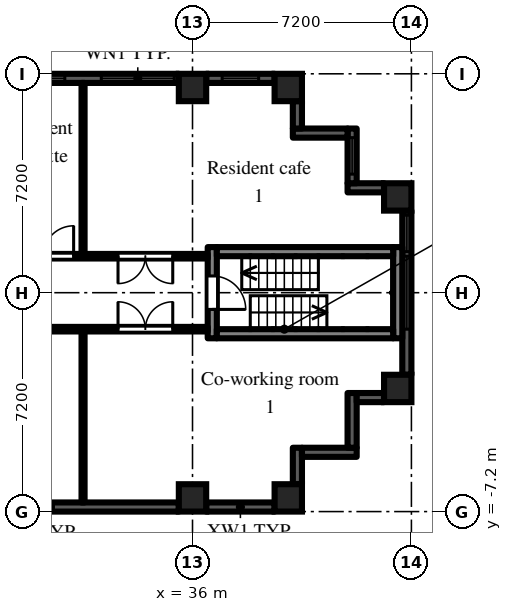
"""IFC4 building model, lengths in metres.
Left out: names, types, materials, properties, quantities, classifications, styles, units other than length and angle.
Written with IfcOpenShell. Run it as: python <this file> out.ifc"""

import sys

from ifc_helpers import new_model, si_unit, direction, frame, frame_2d, origin, origin_2d, place, context, subcontext, project, spatial, rectangle, extrude, element, fill, save


model = new_model("IFC4")
c1 = context("Model", 3, precision=1e-05, world=origin(), true_north=direction((0.0, 1.0)))
c2 = subcontext(c1, "Body", "Model", "MODEL_VIEW")
j1 = project(units=[si_unit("LENGTHUNIT", "METRE"), si_unit("PLANEANGLEUNIT", "RADIAN")], contexts=[c1])
p1 = place(None, origin())
s1 = spatial("IfcSite", under=j1, at=p1, CompositionType="ELEMENT")
p2 = place(p1, origin())
s2 = spatial("IfcBuilding", under=s1, at=p2, CompositionType="ELEMENT")
p3 = place(p2, frame((0.0, 0.0, 44.7)))
s3 = spatial("IfcBuildingStorey", under=s2, at=p3, CompositionType="ELEMENT", Elevation=44.7)
for number, where, z_axis, x_axis in (
    (1, (36.0, -6.75, 0.0), (0.0, 0.0, 1.0), (1.0, 0.0, 0.0)),
    (2, (36.0, 6.75, 0.0), (0.0, 0.0, 1.0), (1.0, 0.0, 0.0)),
    (3, (39.15, -6.75, 0.0), (0.0, 0.0, 1.0), (1.0, 0.0, 0.0)),
    (4, (39.15, 6.75, 0.0), (0.0, 0.0, 1.0), (1.0, 0.0, 0.0)),
    (5, (42.75, -3.15, 0.0), (0.0, 0.0, 1.0), (1.0, 0.0, 0.0)),
    (6, (42.75, 3.15, 0.0), (0.0, 0.0, 1.0), (1.0, 0.0, 0.0)),
):
    element("IfcColumn", number, at=place(p3, frame(where, z_axis=z_axis, x_axis=x_axis)), inside=s3, PredefinedType="COLUMN", context=c2, shape_type="SweptSolid", body=[
        extrude(rectangle(XDim=0.9, YDim=0.9, at=origin_2d()), origin(), (0.0, 0.0, 1.0), 3.0),
    ])
p4 = place(p3, frame((29.25, -7.05, 0.0), z_axis=(0.0, 0.0, 1.0), x_axis=(1.0, 0.0, 0.0)))
e7 = element("IfcWall", 7, at=p4, inside=s3, PredefinedType="SOLIDWALL", context=c2, shape_type="SweptSolid", body=[
    extrude(rectangle(XDim=6.3, YDim=0.3, at=frame_2d((3.15, 0.0))), origin(), (0.0, 0.0, 1.0), 2.1),
])
p5 = place(p4, frame((0.975, 0.0, 0.2)))
e8 = element("IfcOpeningElement", 8, at=p5, cuts=e7, PredefinedType="OPENING", context=c2, shape_type="SweptSolid", body=[
    extrude(rectangle(XDim=1.2, YDim=1.85, at=frame_2d((0.6, 0.925))), frame((0.0, 0.16, 0.0), z_axis=(0.0, -1.0, 0.0), x_axis=(1.0, 0.0, 0.0)), (0.0, 0.0, 1.0), 0.32),
])
p6 = place(p3, frame((36.45, -7.05, 0.0), z_axis=(0.0, 0.0, 1.0), x_axis=(1.0, 0.0, 0.0)))
e9 = element("IfcWall", 9, at=p6, inside=s3, PredefinedType="SOLIDWALL", context=c2, shape_type="SweptSolid", body=[
    extrude(rectangle(XDim=2.25, YDim=0.3, at=frame_2d((1.125, 0.0))), origin(), (0.0, 0.0, 1.0), 2.1),
])
p7 = place(p3, frame((39.45, -6.3, 0.0), z_axis=(0.0, 0.0, 1.0), x_axis=(0.0, 1.0, 0.0)))
e10 = element("IfcWall", 10, at=p7, inside=s3, PredefinedType="SOLIDWALL", context=c2, shape_type="SweptSolid", body=[
    extrude(rectangle(XDim=1.2, YDim=0.3, at=frame_2d((0.6, 0.0))), origin(), (0.0, 0.0, 1.0), 2.575),
])
p8 = place(p3, frame((39.6, -5.25, 0.0), z_axis=(0.0, 0.0, 1.0), x_axis=(1.0, 0.0, 0.0)))
e11 = element("IfcWall", 11, at=p8, inside=s3, PredefinedType="SOLIDWALL", context=c2, shape_type="SweptSolid", body=[
    extrude(rectangle(XDim=1.8, YDim=0.3, at=frame_2d((0.9, 0.0))), origin(), (0.0, 0.0, 1.0), 2.575),
])
p9 = place(p3, frame((41.25, -5.1, 0.0), z_axis=(0.0, 0.0, 1.0), x_axis=(0.0, 1.0, 0.0)))
e12 = element("IfcWall", 12, at=p9, inside=s3, PredefinedType="SOLIDWALL", context=c2, shape_type="SweptSolid", body=[
    extrude(rectangle(XDim=1.8, YDim=0.3, at=frame_2d((0.9, 0.0))), origin(), (0.0, 0.0, 1.0), 2.575),
])
p10 = place(p3, frame((41.4, -3.45, 0.0), z_axis=(0.0, 0.0, 1.0), x_axis=(1.0, 0.0, 0.0)))
e13 = element("IfcWall", 13, at=p10, inside=s3, PredefinedType="SOLIDWALL", context=c2, shape_type="SweptSolid", body=[
    extrude(rectangle(XDim=0.9, YDim=0.3, at=frame_2d((0.45, 0.0))), origin(), (0.0, 0.0, 1.0), 2.575),
])
p11 = place(p3, frame((43.05, -2.7, 0.0), z_axis=(0.0, 0.0, 1.0), x_axis=(0.0, 1.0, 0.0)))
e14 = element("IfcWall", 14, at=p11, inside=s3, PredefinedType="SOLIDWALL", context=c2, shape_type="SweptSolid", body=[
    extrude(rectangle(XDim=5.4, YDim=0.3, at=frame_2d((2.7, 0.0))), origin(), (0.0, 0.0, 1.0), 2.1),
])
p12 = place(p11, frame((1.5, 0.0, 0.2)))
e15 = element("IfcOpeningElement", 15, at=p12, cuts=e14, PredefinedType="OPENING", context=c2, shape_type="SweptSolid", body=[
    extrude(rectangle(XDim=2.4, YDim=1.85, at=frame_2d((1.2, 0.925))), frame((0.0, 0.16, 0.0), z_axis=(0.0, -1.0, 0.0), x_axis=(1.0, 0.0, 0.0)), (0.0, 0.0, 1.0), 0.32),
])
p13 = place(p11, frame((4.05, 0.0, 0.2)))
e16 = element("IfcOpeningElement", 16, at=p13, cuts=e14, PredefinedType="OPENING", context=c2, shape_type="SweptSolid", body=[
    extrude(rectangle(XDim=1.2, YDim=1.85, at=frame_2d((0.6, 0.925))), frame((0.0, 0.16, 0.0), z_axis=(0.0, -1.0, 0.0), x_axis=(1.0, 0.0, 0.0)), (0.0, 0.0, 1.0), 0.32),
])
p14 = place(p3, frame((42.3, 3.45, 0.0), z_axis=(0.0, 0.0, 1.0), x_axis=(-1.0, 0.0, 0.0)))
e17 = element("IfcWall", 17, at=p14, inside=s3, PredefinedType="SOLIDWALL", context=c2, shape_type="SweptSolid", body=[
    extrude(rectangle(XDim=1.2, YDim=0.3, at=frame_2d((0.6, 0.0))), origin(), (0.0, 0.0, 1.0), 2.575),
])
p15 = place(p3, frame((41.25, 3.6, 0.0), z_axis=(0.0, 0.0, 1.0), x_axis=(0.0, 1.0, 0.0)))
e18 = element("IfcWall", 18, at=p15, inside=s3, PredefinedType="SOLIDWALL", context=c2, shape_type="SweptSolid", body=[
    extrude(rectangle(XDim=1.8, YDim=0.3, at=frame_2d((0.9, 0.0))), origin(), (0.0, 0.0, 1.0), 2.575),
])
p16 = place(p15, frame((0.3, 0.0, 0.2)))
e19 = element("IfcOpeningElement", 19, at=p16, cuts=e18, PredefinedType="OPENING", context=c2, shape_type="SweptSolid", body=[
    extrude(rectangle(XDim=1.2, YDim=1.85, at=frame_2d((0.6, 0.925))), frame((0.0, 0.16, 0.0), z_axis=(0.0, -1.0, 0.0), x_axis=(1.0, 0.0, 0.0)), (0.0, 0.0, 1.0), 0.32),
])
p17 = place(p3, frame((41.1, 5.25, 0.0), z_axis=(0.0, 0.0, 1.0), x_axis=(-1.0, 0.0, 0.0)))
e20 = element("IfcWall", 20, at=p17, inside=s3, PredefinedType="SOLIDWALL", context=c2, shape_type="SweptSolid", body=[
    extrude(rectangle(XDim=1.8, YDim=0.3, at=frame_2d((0.9, 0.0))), origin(), (0.0, 0.0, 1.0), 2.575),
])
p18 = place(p3, frame((39.45, 5.4, 0.0), z_axis=(0.0, 0.0, 1.0), x_axis=(0.0, 1.0, 0.0)))
e21 = element("IfcWall", 21, at=p18, inside=s3, PredefinedType="SOLIDWALL", context=c2, shape_type="SweptSolid", body=[
    extrude(rectangle(XDim=0.9, YDim=0.3, at=frame_2d((0.45, 0.0))), origin(), (0.0, 0.0, 1.0), 2.575),
])
p19 = place(p3, frame((38.7, 7.05, 0.0), z_axis=(0.0, 0.0, 1.0), x_axis=(-1.0, 0.0, 0.0)))
e22 = element("IfcWall", 22, at=p19, inside=s3, PredefinedType="SOLIDWALL", context=c2, shape_type="SweptSolid", body=[
    extrude(rectangle(XDim=2.25, YDim=0.3, at=frame_2d((1.125, 0.0))), origin(), (0.0, 0.0, 1.0), 2.1),
])
p20 = place(p19, frame((0.525, 0.0, 0.2)))
e23 = element("IfcOpeningElement", 23, at=p20, cuts=e22, PredefinedType="OPENING", context=c2, shape_type="SweptSolid", body=[
    extrude(rectangle(XDim=1.2, YDim=1.85, at=frame_2d((0.6, 0.925))), frame((0.0, 0.16, 0.0), z_axis=(0.0, -1.0, 0.0), x_axis=(1.0, 0.0, 0.0)), (0.0, 0.0, 1.0), 0.32),
])
p21 = place(p3, frame((35.55, 7.05, 0.0), z_axis=(0.0, 0.0, 1.0), x_axis=(-1.0, 0.0, 0.0)))
e24 = element("IfcWall", 24, at=p21, inside=s3, PredefinedType="SOLIDWALL", context=c2, shape_type="SweptSolid", body=[
    extrude(rectangle(XDim=6.3, YDim=0.3, at=frame_2d((3.15, 0.0))), origin(), (0.0, 0.0, 1.0), 2.1),
])
p22 = place(p21, frame((0.15, 0.0, 0.2)))
e25 = element("IfcOpeningElement", 25, at=p22, cuts=e24, PredefinedType="OPENING", context=c2, shape_type="SweptSolid", body=[
    extrude(rectangle(XDim=2.4, YDim=1.85, at=frame_2d((1.2, 0.925))), frame((0.0, 0.16, 0.0), z_axis=(0.0, -1.0, 0.0), x_axis=(1.0, 0.0, 0.0)), (0.0, 0.0, 1.0), 0.32),
])
p23 = place(p21, frame((3.75, 0.0, 0.2)))
e26 = element("IfcOpeningElement", 26, at=p23, cuts=e24, PredefinedType="OPENING", context=c2, shape_type="SweptSolid", body=[
    extrude(rectangle(XDim=2.4, YDim=1.85, at=frame_2d((1.2, 0.925))), frame((0.0, 0.16, 0.0), z_axis=(0.0, -1.0, 0.0), x_axis=(1.0, 0.0, 0.0)), (0.0, 0.0, 1.0), 0.32),
])
p24 = place(p3, frame((36.65, -1.5, 0.0), z_axis=(0.0, 0.0, 1.0), x_axis=(0.0, 1.0, 0.0)))
e27 = element("IfcWall", 27, at=p24, inside=s3, PredefinedType="SHEAR", context=c2, shape_type="SweptSolid", body=[
    extrude(rectangle(XDim=3.0, YDim=0.3, at=frame_2d((1.5, 0.0))), origin(), (0.0, 0.0, 1.0), 2.575),
])
p25 = place(p24, frame((0.95, 0.0, 0.0)))
e28 = element("IfcOpeningElement", 28, at=p25, cuts=e27, PredefinedType="OPENING", context=c2, shape_type="SweptSolid", body=[
    extrude(rectangle(XDim=1.1, YDim=2.1, at=frame_2d((0.55, 1.05))), frame((0.0, 0.16, 0.0), z_axis=(0.0, -1.0, 0.0), x_axis=(1.0, 0.0, 0.0)), (0.0, 0.0, 1.0), 0.32),
])
p26 = place(p3, frame((42.75, -1.5, 0.0), z_axis=(0.0, 0.0, 1.0), x_axis=(0.0, 1.0, 0.0)))
e29 = element("IfcWall", 29, at=p26, inside=s3, PredefinedType="SHEAR", context=c2, shape_type="SweptSolid", body=[
    extrude(rectangle(XDim=3.0, YDim=0.3, at=frame_2d((1.5, 0.0))), origin(), (0.0, 0.0, 1.0), 2.575),
])
for number, where, z_axis, x_axis in (
    (30, (36.8, -1.35, 0.0), (0.0, 0.0, 1.0), (1.0, 0.0, 0.0)),
    (31, (36.8, 1.35, 0.0), (0.0, 0.0, 1.0), (1.0, 0.0, 0.0)),
):
    element("IfcWall", number, at=place(p3, frame(where, z_axis=z_axis, x_axis=x_axis)), inside=s3, PredefinedType="SHEAR", context=c2, shape_type="SweptSolid", body=[
        extrude(rectangle(XDim=5.8, YDim=0.3, at=frame_2d((2.9, 0.0))), origin(), (0.0, 0.0, 1.0), 2.575),
    ])
p27 = place(p3, frame((21.6, -1.2, 0.0), z_axis=(0.0, 0.0, 1.0), x_axis=(1.0, 0.0, 0.0)))
e32 = element("IfcWall", 32, at=p27, inside=s3, PredefinedType="PARTITIONING", context=c2, shape_type="SweptSolid", body=[
    extrude(rectangle(XDim=14.9, YDim=0.15, at=frame_2d((7.45, 0.0))), origin(), (0.0, 0.0, 1.0), 2.575),
])
p28 = place(p27, frame((0.45, 0.0, 0.0)))
e33 = element("IfcOpeningElement", 33, at=p28, cuts=e32, PredefinedType="OPENING", context=c2, shape_type="SweptSolid", body=[
    extrude(rectangle(XDim=0.9, YDim=2.1, at=frame_2d((0.45, 1.05))), frame((0.0, 0.085, 0.0), z_axis=(0.0, -1.0, 0.0), x_axis=(1.0, 0.0, 0.0)), (0.0, 0.0, 1.0), 0.17),
])
p29 = place(p27, frame((2.25, 0.0, 0.0)))
e34 = element("IfcOpeningElement", 34, at=p29, cuts=e32, PredefinedType="OPENING", context=c2, shape_type="SweptSolid", body=[
    extrude(rectangle(XDim=0.9, YDim=2.1, at=frame_2d((0.45, 1.05))), frame((0.0, 0.085, 0.0), z_axis=(0.0, -1.0, 0.0), x_axis=(1.0, 0.0, 0.0)), (0.0, 0.0, 1.0), 0.17),
])
p30 = place(p27, frame((4.05, 0.0, 0.0)))
e35 = element("IfcOpeningElement", 35, at=p30, cuts=e32, PredefinedType="OPENING", context=c2, shape_type="SweptSolid", body=[
    extrude(rectangle(XDim=0.9, YDim=2.1, at=frame_2d((0.45, 1.05))), frame((0.0, 0.085, 0.0), z_axis=(0.0, -1.0, 0.0), x_axis=(1.0, 0.0, 0.0)), (0.0, 0.0, 1.0), 0.17),
])
p31 = place(p27, frame((5.85, 0.0, 0.0)))
e36 = element("IfcOpeningElement", 36, at=p31, cuts=e32, PredefinedType="OPENING", context=c2, shape_type="SweptSolid", body=[
    extrude(rectangle(XDim=0.9, YDim=2.1, at=frame_2d((0.45, 1.05))), frame((0.0, 0.085, 0.0), z_axis=(0.0, -1.0, 0.0), x_axis=(1.0, 0.0, 0.0)), (0.0, 0.0, 1.0), 0.17),
])
p32 = place(p27, frame((8.55, 0.0, 0.0)))
e37 = element("IfcOpeningElement", 37, at=p32, cuts=e32, PredefinedType="OPENING", context=c2, shape_type="SweptSolid", body=[
    extrude(rectangle(XDim=0.9, YDim=2.1, at=frame_2d((0.45, 1.05))), frame((0.0, 0.085, 0.0), z_axis=(0.0, -1.0, 0.0), x_axis=(1.0, 0.0, 0.0)), (0.0, 0.0, 1.0), 0.17),
])
p33 = place(p27, frame((11.95, 0.0, 0.0)))
e38 = element("IfcOpeningElement", 38, at=p33, cuts=e32, PredefinedType="OPENING", context=c2, shape_type="SweptSolid", body=[
    extrude(rectangle(XDim=1.8, YDim=2.1, at=frame_2d((0.9, 1.05))), frame((0.0, 0.085, 0.0), z_axis=(0.0, -1.0, 0.0), x_axis=(1.0, 0.0, 0.0)), (0.0, 0.0, 1.0), 0.17),
])
p34 = place(p3, frame((21.6, 1.2, 0.0), z_axis=(0.0, 0.0, 1.0), x_axis=(1.0, 0.0, 0.0)))
e39 = element("IfcWall", 39, at=p34, inside=s3, PredefinedType="PARTITIONING", context=c2, shape_type="SweptSolid", body=[
    extrude(rectangle(XDim=14.9, YDim=0.15, at=frame_2d((7.45, 0.0))), origin(), (0.0, 0.0, 1.0), 2.575),
])
p35 = place(p34, frame((1.35, 0.0, 0.0)))
e40 = element("IfcOpeningElement", 40, at=p35, cuts=e39, PredefinedType="OPENING", context=c2, shape_type="SweptSolid", body=[
    extrude(rectangle(XDim=0.9, YDim=2.1, at=frame_2d((0.45, 1.05))), frame((0.0, 0.085, 0.0), z_axis=(0.0, -1.0, 0.0), x_axis=(1.0, 0.0, 0.0)), (0.0, 0.0, 1.0), 0.17),
])
p36 = place(p34, frame((9.49, 0.0, 0.0)))
e41 = element("IfcOpeningElement", 41, at=p36, cuts=e39, PredefinedType="OPENING", context=c2, shape_type="SweptSolid", body=[
    extrude(rectangle(XDim=1.0, YDim=2.1, at=frame_2d((0.5, 1.05))), frame((0.0, 0.085, 0.0), z_axis=(0.0, -1.0, 0.0), x_axis=(1.0, 0.0, 0.0)), (0.0, 0.0, 1.0), 0.17),
])
p37 = place(p34, frame((11.95, 0.0, 0.0)))
e42 = element("IfcOpeningElement", 42, at=p37, cuts=e39, PredefinedType="OPENING", context=c2, shape_type="SweptSolid", body=[
    extrude(rectangle(XDim=1.8, YDim=2.1, at=frame_2d((0.9, 1.05))), frame((0.0, 0.085, 0.0), z_axis=(0.0, -1.0, 0.0), x_axis=(1.0, 0.0, 0.0)), (0.0, 0.0, 1.0), 0.17),
])
for number, where, z_axis, x_axis in (
    (43, (32.4, -6.9, 0.0), (0.0, 0.0, 1.0), (0.0, 1.0, 0.0)),
    (44, (32.4, 1.275, 0.0), (0.0, 0.0, 1.0), (0.0, 1.0, 0.0)),
):
    element("IfcWall", number, at=place(p3, frame(where, z_axis=z_axis, x_axis=x_axis)), inside=s3, PredefinedType="PARTITIONING", context=c2, shape_type="SweptSolid", body=[
        extrude(rectangle(XDim=5.625, YDim=0.1, at=frame_2d((2.812, 0.0))), origin(), (0.0, 0.0, 1.0), 2.575),
    ])
p38 = place(p5, origin())
e45 = element("IfcWindow", 45, at=p38, inside=s3, PartitioningType="SINGLE_PANEL", PredefinedType="WINDOW", context=c2, shape_type="SweptSolid", body=[
    extrude(rectangle(XDim=1.2, YDim=1.85, at=frame_2d((0.6, 0.925))), frame((0.0, 0.03, 0.0), z_axis=(0.0, -1.0, 0.0), x_axis=(1.0, 0.0, 0.0)), (0.0, 0.0, 1.0), 0.06),
])
fill(e8, e45)
p39 = place(p12, origin())
e46 = element("IfcWindow", 46, at=p39, inside=s3, PartitioningType="SINGLE_PANEL", PredefinedType="WINDOW", context=c2, shape_type="SweptSolid", body=[
    extrude(rectangle(XDim=2.4, YDim=1.85, at=frame_2d((1.2, 0.925))), frame((0.0, 0.03, 0.0), z_axis=(0.0, -1.0, 0.0), x_axis=(1.0, 0.0, 0.0)), (0.0, 0.0, 1.0), 0.06),
])
fill(e15, e46)
p40 = place(p13, origin())
e47 = element("IfcWindow", 47, at=p40, inside=s3, PartitioningType="SINGLE_PANEL", PredefinedType="WINDOW", context=c2, shape_type="SweptSolid", body=[
    extrude(rectangle(XDim=1.2, YDim=1.85, at=frame_2d((0.6, 0.925))), frame((0.0, 0.03, 0.0), z_axis=(0.0, -1.0, 0.0), x_axis=(1.0, 0.0, 0.0)), (0.0, 0.0, 1.0), 0.06),
])
fill(e16, e47)
p41 = place(p16, origin())
e48 = element("IfcWindow", 48, at=p41, inside=s3, PartitioningType="SINGLE_PANEL", PredefinedType="WINDOW", context=c2, shape_type="SweptSolid", body=[
    extrude(rectangle(XDim=1.2, YDim=1.85, at=frame_2d((0.6, 0.925))), frame((0.0, 0.03, 0.0), z_axis=(0.0, -1.0, 0.0), x_axis=(1.0, 0.0, 0.0)), (0.0, 0.0, 1.0), 0.06),
])
fill(e19, e48)
p42 = place(p20, origin())
e49 = element("IfcWindow", 49, at=p42, inside=s3, PartitioningType="SINGLE_PANEL", PredefinedType="WINDOW", context=c2, shape_type="SweptSolid", body=[
    extrude(rectangle(XDim=1.2, YDim=1.85, at=frame_2d((0.6, 0.925))), frame((0.0, 0.03, 0.0), z_axis=(0.0, -1.0, 0.0), x_axis=(1.0, 0.0, 0.0)), (0.0, 0.0, 1.0), 0.06),
])
fill(e23, e49)
p43 = place(p22, origin())
e50 = element("IfcWindow", 50, at=p43, inside=s3, PartitioningType="SINGLE_PANEL", PredefinedType="WINDOW", context=c2, shape_type="SweptSolid", body=[
    extrude(rectangle(XDim=2.4, YDim=1.85, at=frame_2d((1.2, 0.925))), frame((0.0, 0.03, 0.0), z_axis=(0.0, -1.0, 0.0), x_axis=(1.0, 0.0, 0.0)), (0.0, 0.0, 1.0), 0.06),
])
fill(e25, e50)
p44 = place(p23, origin())
e51 = element("IfcWindow", 51, at=p44, inside=s3, PartitioningType="SINGLE_PANEL", PredefinedType="WINDOW", context=c2, shape_type="SweptSolid", body=[
    extrude(rectangle(XDim=2.4, YDim=1.85, at=frame_2d((1.2, 0.925))), frame((0.0, 0.03, 0.0), z_axis=(0.0, -1.0, 0.0), x_axis=(1.0, 0.0, 0.0)), (0.0, 0.0, 1.0), 0.06),
])
fill(e26, e51)
p45 = place(p25, frame((1.1, 0.0, 0.0), z_axis=(0.0, 0.0, 1.0), x_axis=(-1.0, 0.0, 0.0)))
e52 = element("IfcDoor", 52, at=p45, inside=s3, OperationType="SINGLE_SWING_RIGHT", PredefinedType="DOOR", context=c2, shape_type="SweptSolid", body=[
    extrude(rectangle(XDim=1.1, YDim=2.1, at=frame_2d((0.55, 1.05))), frame((0.0, 0.025, 0.0), z_axis=(0.0, -1.0, 0.0), x_axis=(1.0, 0.0, 0.0)), (0.0, 0.0, 1.0), 0.05),
])
fill(e28, e52)
p46 = place(p36, origin())
e53 = element("IfcDoor", 53, at=p46, inside=s3, OperationType="SINGLE_SWING_RIGHT", PredefinedType="DOOR", context=c2, shape_type="SweptSolid", body=[
    extrude(rectangle(XDim=1.0, YDim=2.1, at=frame_2d((0.5, 1.05))), frame((0.0, 0.025, 0.0), z_axis=(0.0, -1.0, 0.0), x_axis=(1.0, 0.0, 0.0)), (0.0, 0.0, 1.0), 0.05),
])
fill(e41, e53)
p47 = place(p37, frame((1.8, 0.0, 0.0), z_axis=(0.0, 0.0, 1.0), x_axis=(-1.0, 0.0, 0.0)))
e54 = element("IfcDoor", 54, at=p47, inside=s3, OperationType="DOUBLE_DOOR_DOUBLE_SWING", PredefinedType="DOOR", context=c2, shape_type="SweptSolid", body=[
    extrude(rectangle(XDim=1.8, YDim=2.1, at=frame_2d((0.9, 1.05))), frame((0.0, 0.025, 0.0), z_axis=(0.0, -1.0, 0.0), x_axis=(1.0, 0.0, 0.0)), (0.0, 0.0, 1.0), 0.05),
])
fill(e42, e54)
p48 = place(p33, origin())
e55 = element("IfcDoor", 55, at=p48, inside=s3, OperationType="DOUBLE_DOOR_DOUBLE_SWING", PredefinedType="DOOR", context=c2, shape_type="SweptSolid", body=[
    extrude(rectangle(XDim=1.8, YDim=2.1, at=frame_2d((0.9, 1.05))), frame((0.0, 0.025, 0.0), z_axis=(0.0, -1.0, 0.0), x_axis=(1.0, 0.0, 0.0)), (0.0, 0.0, 1.0), 0.05),
])
fill(e38, e55)
save(model, sys.argv[1])
